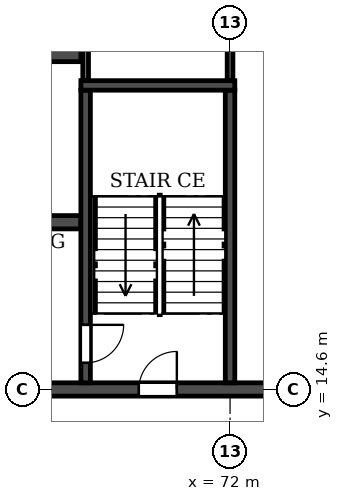
"""IFC4 building model, lengths in metres.
Left out: names, types, materials, properties, quantities, classifications, styles, units other than length and angle.
Written with IfcOpenShell. Run it as: python <this file> out.ifc"""

import sys

from ifc_helpers import new_model, si_unit, direction, frame, frame_2d, origin, place, context, subcontext, project, spatial, rectangle, extrude, element, fill, save


model = new_model("IFC4")
c1 = context("Model", 3, precision=1e-05, world=origin(), true_north=direction((0.0, 1.0)))
c2 = subcontext(c1, "Body", "Model", "MODEL_VIEW")
j1 = project(units=[si_unit("LENGTHUNIT", "METRE"), si_unit("PLANEANGLEUNIT", "RADIAN")], contexts=[c1])
p1 = place(None, origin())
s1 = spatial("IfcSite", under=j1, at=p1, CompositionType="ELEMENT")
p2 = place(p1, origin())
s2 = spatial("IfcBuilding", under=s1, at=p2, CompositionType="ELEMENT")
p3 = place(p2, frame((0.0, 0.0, 257.7)))
s3 = spatial("IfcBuildingStorey", under=s2, at=p3, CompositionType="ELEMENT", Elevation=257.7)
p4 = place(p3, frame((18.2, 14.6, 0.0), z_axis=(0.0, 0.0, 1.0), x_axis=(1.0, 0.0, 0.0)))
e1 = element("IfcWall", 1, at=p4, inside=s3, PredefinedType="SOLIDWALL", context=c2, shape_type="SweptSolid", body=[
    extrude(rectangle(XDim=65.6, YDim=0.35, at=frame_2d((32.8, 0.0))), origin(), (0.0, 0.0, 1.0), 3.0),
])
p5 = place(p4, frame((0.7, 0.0, 0.0)))
e2 = element("IfcOpeningElement", 2, at=p5, cuts=e1, PredefinedType="OPENING", context=c2, shape_type="SweptSolid", body=[
    extrude(rectangle(XDim=1.0, YDim=2.1, at=frame_2d((0.5, 1.05))), frame((0.0, 0.185, 0.0), z_axis=(0.0, -1.0, 0.0), x_axis=(1.0, 0.0, 0.0)), (0.0, 0.0, 1.0), 0.37),
])
p6 = place(p4, frame((8.6, 0.0, 0.0)))
e3 = element("IfcOpeningElement", 3, at=p6, cuts=e1, PredefinedType="OPENING", context=c2, shape_type="SweptSolid", body=[
    extrude(rectangle(XDim=1.0, YDim=2.1, at=frame_2d((0.5, 1.05))), frame((0.0, 0.185, 0.0), z_axis=(0.0, -1.0, 0.0), x_axis=(1.0, 0.0, 0.0)), (0.0, 0.0, 1.0), 0.37),
])
p7 = place(p4, frame((13.2, 0.0, 0.0)))
e4 = element("IfcOpeningElement", 4, at=p7, cuts=e1, PredefinedType="OPENING", context=c2, shape_type="SweptSolid", body=[
    extrude(rectangle(XDim=1.0, YDim=2.1, at=frame_2d((0.5, 1.05))), frame((0.0, 0.185, 0.0), z_axis=(0.0, -1.0, 0.0), x_axis=(1.0, 0.0, 0.0)), (0.0, 0.0, 1.0), 0.37),
])
p8 = place(p4, frame((24.5, 0.0, 0.0)))
e5 = element("IfcOpeningElement", 5, at=p8, cuts=e1, PredefinedType="OPENING", context=c2, shape_type="SweptSolid", body=[
    extrude(rectangle(XDim=1.0, YDim=2.1, at=frame_2d((0.5, 1.05))), frame((0.0, 0.185, 0.0), z_axis=(0.0, -1.0, 0.0), x_axis=(1.0, 0.0, 0.0)), (0.0, 0.0, 1.0), 0.37),
])
p9 = place(p4, frame((28.4, 0.0, 0.0)))
e6 = element("IfcOpeningElement", 6, at=p9, cuts=e1, PredefinedType="OPENING", context=c2, shape_type="SweptSolid", body=[
    extrude(rectangle(XDim=1.0, YDim=2.1, at=frame_2d((0.5, 1.05))), frame((0.0, 0.185, 0.0), z_axis=(0.0, -1.0, 0.0), x_axis=(1.0, 0.0, 0.0)), (0.0, 0.0, 1.0), 0.37),
])
p10 = place(p4, frame((32.3, 0.0, 0.0)))
e7 = element("IfcOpeningElement", 7, at=p10, cuts=e1, PredefinedType="OPENING", context=c2, shape_type="SweptSolid", body=[
    extrude(rectangle(XDim=1.0, YDim=2.1, at=frame_2d((0.5, 1.05))), frame((0.0, 0.185, 0.0), z_axis=(0.0, -1.0, 0.0), x_axis=(1.0, 0.0, 0.0)), (0.0, 0.0, 1.0), 0.37),
])
p11 = place(p4, frame((34.9, 0.0, 0.0)))
e8 = element("IfcOpeningElement", 8, at=p11, cuts=e1, PredefinedType="OPENING", context=c2, shape_type="SweptSolid", body=[
    extrude(rectangle(XDim=1.0, YDim=2.1, at=frame_2d((0.5, 1.05))), frame((0.0, 0.185, 0.0), z_axis=(0.0, -1.0, 0.0), x_axis=(1.0, 0.0, 0.0)), (0.0, 0.0, 1.0), 0.37),
])
p12 = place(p4, frame((38.8, 0.0, 0.0)))
e9 = element("IfcOpeningElement", 9, at=p12, cuts=e1, PredefinedType="OPENING", context=c2, shape_type="SweptSolid", body=[
    extrude(rectangle(XDim=1.0, YDim=2.1, at=frame_2d((0.5, 1.05))), frame((0.0, 0.185, 0.0), z_axis=(0.0, -1.0, 0.0), x_axis=(1.0, 0.0, 0.0)), (0.0, 0.0, 1.0), 0.37),
])
p13 = place(p4, frame((51.4, 0.0, 0.0)))
e10 = element("IfcOpeningElement", 10, at=p13, cuts=e1, PredefinedType="OPENING", context=c2, shape_type="SweptSolid", body=[
    extrude(rectangle(XDim=1.0, YDim=2.1, at=frame_2d((0.5, 1.05))), frame((0.0, 0.185, 0.0), z_axis=(0.0, -1.0, 0.0), x_axis=(1.0, 0.0, 0.0)), (0.0, 0.0, 1.0), 0.37),
])
p14 = place(p4, frame((56.0, 0.0, 0.0)))
e11 = element("IfcOpeningElement", 11, at=p14, cuts=e1, PredefinedType="OPENING", context=c2, shape_type="SweptSolid", body=[
    extrude(rectangle(XDim=1.0, YDim=2.1, at=frame_2d((0.5, 1.05))), frame((0.0, 0.185, 0.0), z_axis=(0.0, -1.0, 0.0), x_axis=(1.0, 0.0, 0.0)), (0.0, 0.0, 1.0), 0.37),
])
p15 = place(p4, frame((63.9, 0.0, 0.0)))
e12 = element("IfcOpeningElement", 12, at=p15, cuts=e1, PredefinedType="OPENING", context=c2, shape_type="SweptSolid", body=[
    extrude(rectangle(XDim=1.0, YDim=2.1, at=frame_2d((0.5, 1.05))), frame((0.0, 0.185, 0.0), z_axis=(0.0, -1.0, 0.0), x_axis=(1.0, 0.0, 0.0)), (0.0, 0.0, 1.0), 0.37),
])
p16 = place(p3, frame((33.925, 19.0, 0.0), z_axis=(0.0, 0.0, 1.0), x_axis=(1.0, 0.0, 0.0)))
e13 = element("IfcWall", 13, at=p16, inside=s3, PredefinedType="SOLIDWALL", context=c2, shape_type="SweptSolid", body=[
    extrude(rectangle(XDim=34.15, YDim=0.35, at=frame_2d((17.075, 0.0))), origin(), (0.0, 0.0, 1.0), 3.0),
])
p17 = place(p16, frame((16.175, 0.0, 0.0)))
e14 = element("IfcOpeningElement", 14, at=p17, cuts=e13, PredefinedType="OPENING", context=c2, shape_type="SweptSolid", body=[
    extrude(rectangle(XDim=1.8, YDim=2.1, at=frame_2d((0.9, 1.05))), frame((0.0, 0.185, 0.0), z_axis=(0.0, -1.0, 0.0), x_axis=(1.0, 0.0, 0.0)), (0.0, 0.0, 1.0), 0.37),
])
p18 = place(p16, frame((1.525, 0.0, 0.0)))
e15 = element("IfcOpeningElement", 15, at=p18, cuts=e13, PredefinedType="OPENING", context=c2, shape_type="SweptSolid", body=[
    extrude(rectangle(XDim=1.8, YDim=2.1, at=frame_2d((0.9, 1.05))), frame((0.0, 0.185, 0.0), z_axis=(0.0, -1.0, 0.0), x_axis=(1.0, 0.0, 0.0)), (0.0, 0.0, 1.0), 0.37),
])
p19 = place(p16, frame((30.825, 0.0, 0.0)))
e16 = element("IfcOpeningElement", 16, at=p19, cuts=e13, PredefinedType="OPENING", context=c2, shape_type="SweptSolid", body=[
    extrude(rectangle(XDim=1.8, YDim=2.1, at=frame_2d((0.9, 1.05))), frame((0.0, 0.185, 0.0), z_axis=(0.0, -1.0, 0.0), x_axis=(1.0, 0.0, 0.0)), (0.0, 0.0, 1.0), 0.37),
])
p20 = place(p3, frame((33.925, 23.4, 0.0), z_axis=(0.0, 0.0, 1.0), x_axis=(1.0, 0.0, 0.0)))
e17 = element("IfcWall", 17, at=p20, inside=s3, PredefinedType="SOLIDWALL", context=c2, shape_type="SweptSolid", body=[
    extrude(rectangle(XDim=34.15, YDim=0.35, at=frame_2d((17.075, 0.0))), origin(), (0.0, 0.0, 1.0), 3.0),
])
p21 = place(p20, frame((16.175, 0.0, 0.0)))
e18 = element("IfcOpeningElement", 18, at=p21, cuts=e17, PredefinedType="OPENING", context=c2, shape_type="SweptSolid", body=[
    extrude(rectangle(XDim=1.8, YDim=2.1, at=frame_2d((0.9, 1.05))), frame((0.0, 0.185, 0.0), z_axis=(0.0, -1.0, 0.0), x_axis=(1.0, 0.0, 0.0)), (0.0, 0.0, 1.0), 0.37),
])
p22 = place(p20, frame((0.625, 0.0, 0.0)))
e19 = element("IfcOpeningElement", 19, at=p22, cuts=e17, PredefinedType="OPENING", context=c2, shape_type="SweptSolid", body=[
    extrude(rectangle(XDim=1.1, YDim=2.1, at=frame_2d((0.55, 1.05))), frame((0.0, 0.185, 0.0), z_axis=(0.0, -1.0, 0.0), x_axis=(1.0, 0.0, 0.0)), (0.0, 0.0, 1.0), 0.37),
])
p23 = place(p20, frame((3.225, 0.0, 0.0)))
e20 = element("IfcOpeningElement", 20, at=p23, cuts=e17, PredefinedType="OPENING", context=c2, shape_type="SweptSolid", body=[
    extrude(rectangle(XDim=1.1, YDim=2.1, at=frame_2d((0.55, 1.05))), frame((0.0, 0.185, 0.0), z_axis=(0.0, -1.0, 0.0), x_axis=(1.0, 0.0, 0.0)), (0.0, 0.0, 1.0), 0.37),
])
p24 = place(p20, frame((5.825, 0.0, 0.0)))
e21 = element("IfcOpeningElement", 21, at=p24, cuts=e17, PredefinedType="OPENING", context=c2, shape_type="SweptSolid", body=[
    extrude(rectangle(XDim=1.1, YDim=2.1, at=frame_2d((0.55, 1.05))), frame((0.0, 0.185, 0.0), z_axis=(0.0, -1.0, 0.0), x_axis=(1.0, 0.0, 0.0)), (0.0, 0.0, 1.0), 0.37),
])
p25 = place(p20, frame((8.425, 0.0, 0.0)))
e22 = element("IfcOpeningElement", 22, at=p25, cuts=e17, PredefinedType="OPENING", context=c2, shape_type="SweptSolid", body=[
    extrude(rectangle(XDim=1.1, YDim=2.1, at=frame_2d((0.55, 1.05))), frame((0.0, 0.185, 0.0), z_axis=(0.0, -1.0, 0.0), x_axis=(1.0, 0.0, 0.0)), (0.0, 0.0, 1.0), 0.37),
])
p26 = place(p20, frame((11.025, 0.0, 0.0)))
e23 = element("IfcOpeningElement", 23, at=p26, cuts=e17, PredefinedType="OPENING", context=c2, shape_type="SweptSolid", body=[
    extrude(rectangle(XDim=1.1, YDim=2.1, at=frame_2d((0.55, 1.05))), frame((0.0, 0.185, 0.0), z_axis=(0.0, -1.0, 0.0), x_axis=(1.0, 0.0, 0.0)), (0.0, 0.0, 1.0), 0.37),
])
p27 = place(p20, frame((13.625, 0.0, 0.0)))
e24 = element("IfcOpeningElement", 24, at=p27, cuts=e17, PredefinedType="OPENING", context=c2, shape_type="SweptSolid", body=[
    extrude(rectangle(XDim=1.1, YDim=2.1, at=frame_2d((0.55, 1.05))), frame((0.0, 0.185, 0.0), z_axis=(0.0, -1.0, 0.0), x_axis=(1.0, 0.0, 0.0)), (0.0, 0.0, 1.0), 0.37),
])
p28 = place(p20, frame((27.225, 0.0, 0.0)))
e25 = element("IfcOpeningElement", 25, at=p28, cuts=e17, PredefinedType="OPENING", context=c2, shape_type="SweptSolid", body=[
    extrude(rectangle(XDim=1.1, YDim=2.1, at=frame_2d((0.55, 1.05))), frame((0.0, 0.185, 0.0), z_axis=(0.0, -1.0, 0.0), x_axis=(1.0, 0.0, 0.0)), (0.0, 0.0, 1.0), 0.37),
])
p29 = place(p3, frame((68.2, 14.775, 0.0), z_axis=(0.0, 0.0, 1.0), x_axis=(0.0, 1.0, 0.0)))
e26 = element("IfcWall", 26, at=p29, inside=s3, PredefinedType="SOLIDWALL", context=c2, shape_type="SweptSolid", body=[
    extrude(rectangle(XDim=7.7, YDim=0.25, at=frame_2d((3.85, 0.0))), origin(), (0.0, 0.0, 1.0), 3.0),
])
p30 = place(p29, frame((0.525, 0.0, 0.0)))
e27 = element("IfcOpeningElement", 27, at=p30, cuts=e26, PredefinedType="OPENING", context=c2, shape_type="SweptSolid", body=[
    extrude(rectangle(XDim=1.0, YDim=2.1, at=frame_2d((0.5, 1.05))), frame((0.0, 0.135, 0.0), z_axis=(0.0, -1.0, 0.0), x_axis=(1.0, 0.0, 0.0)), (0.0, 0.0, 1.0), 0.27),
])
p31 = place(p3, frame((72.0, 14.775, 0.0), z_axis=(0.0, 0.0, 1.0), x_axis=(0.0, 1.0, 0.0)))
e28 = element("IfcWall", 28, at=p31, inside=s3, PredefinedType="SOLIDWALL", context=c2, shape_type="SweptSolid", body=[
    extrude(rectangle(XDim=7.7, YDim=0.25, at=frame_2d((3.85, 0.0))), origin(), (0.0, 0.0, 1.0), 3.0),
])
p32 = place(p3, frame((68.075, 22.6, 0.0), z_axis=(0.0, 0.0, 1.0), x_axis=(1.0, 0.0, 0.0)))
e29 = element("IfcWall", 29, at=p32, inside=s3, PredefinedType="SOLIDWALL", context=c2, shape_type="SweptSolid", body=[
    extrude(rectangle(XDim=4.05, YDim=0.25, at=frame_2d((2.025, 0.0))), origin(), (0.0, 0.0, 1.0), 3.0),
])
for number, where, z_axis, x_axis in (
    (30, (68.2, 22.735, 0.0), (0.0, 0.0, 1.0), (0.0, 1.0, 0.0)),
    (31, (72.0, 22.735, 0.0), (0.0, 0.0, 1.0), (0.0, 1.0, 0.0)),
):
    element("IfcWall", number, at=place(p3, frame(where, z_axis=z_axis, x_axis=x_axis)), inside=s3, PredefinedType="PARTITIONING", context=c2, shape_type="SweptSolid", body=[
        extrude(rectangle(XDim=4.88, YDim=0.15, at=frame_2d((2.44, 0.0))), origin(), (0.0, 0.0, 1.0), 3.0),
    ])
p33 = place(p13, origin())
e32 = element("IfcDoor", 32, at=p33, inside=s3, OperationType="SINGLE_SWING_RIGHT", PredefinedType="DOOR", context=c2, shape_type="SweptSolid", body=[
    extrude(rectangle(XDim=1.0, YDim=2.1, at=frame_2d((0.5, 1.05))), frame((0.0, 0.025, 0.0), z_axis=(0.0, -1.0, 0.0), x_axis=(1.0, 0.0, 0.0)), (0.0, 0.0, 1.0), 0.05),
])
fill(e10, e32)
p34 = place(p30, frame((1.0, 0.0, 0.0), z_axis=(0.0, 0.0, 1.0), x_axis=(-1.0, 0.0, 0.0)))
e33 = element("IfcDoor", 33, at=p34, inside=s3, OperationType="SINGLE_SWING_LEFT", PredefinedType="DOOR", context=c2, shape_type="SweptSolid", body=[
    extrude(rectangle(XDim=1.0, YDim=2.1, at=frame_2d((0.5, 1.05))), frame((0.0, 0.025, 0.0), z_axis=(0.0, -1.0, 0.0), x_axis=(1.0, 0.0, 0.0)), (0.0, 0.0, 1.0), 0.05),
])
fill(e27, e33)
save(model, sys.argv[1])
